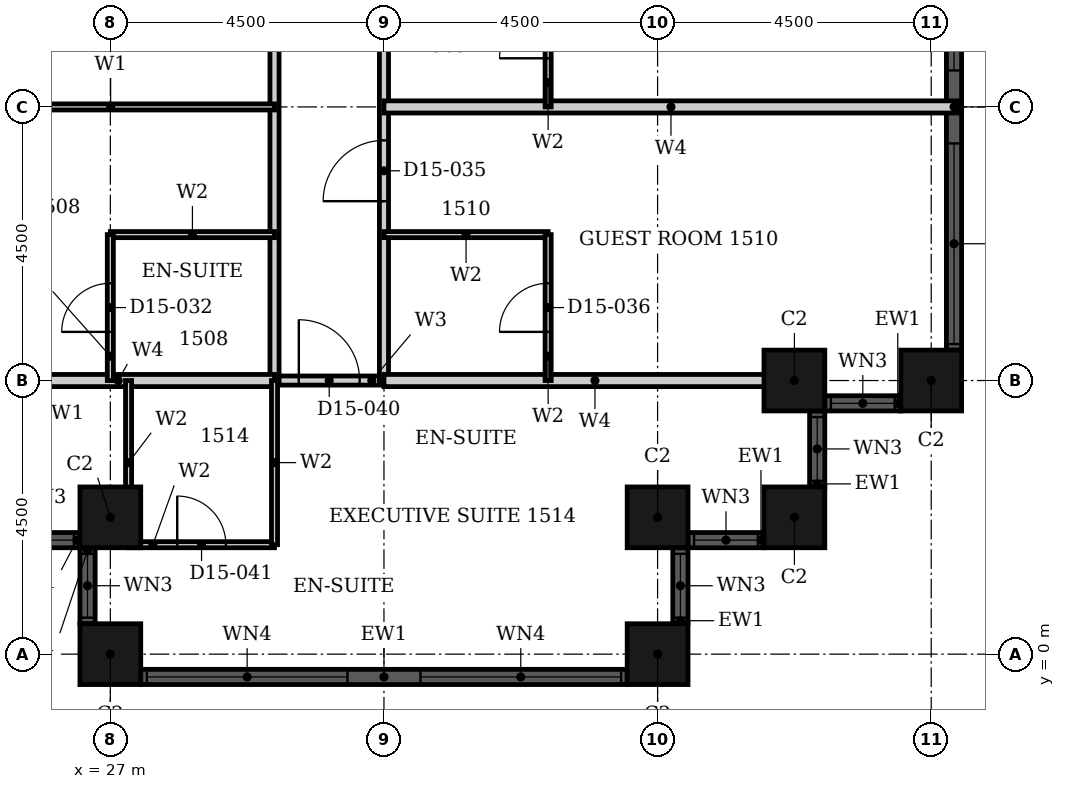
"""IFC4 building model, lengths in metres.
Left out: names, types, materials, properties, quantities, classifications, styles, units other than length and angle.
Written with IfcOpenShell. Run it as: python <this file> out.ifc"""

import sys

from ifc_helpers import new_model, si_unit, direction, frame, frame_2d, origin, origin_2d, place, context, subcontext, project, spatial, rectangle, hollow_rectangle, extrude, element, fill, save


model = new_model("IFC4")
c1 = context("Model", 3, precision=1e-05, world=origin(), true_north=direction((0.0, 1.0)))
c2 = subcontext(c1, "Body", "Model", "MODEL_VIEW")
j1 = project(units=[si_unit("LENGTHUNIT", "METRE"), si_unit("PLANEANGLEUNIT", "RADIAN")], contexts=[c1])
p1 = place(None, origin())
s1 = spatial("IfcSite", under=j1, at=p1, CompositionType="ELEMENT")
p2 = place(p1, origin())
s2 = spatial("IfcBuilding", under=s1, at=p2, CompositionType="ELEMENT")
p3 = place(p2, frame((0.0, 0.0, 67.2)))
s3 = spatial("IfcBuildingStorey", under=s2, at=p3, CompositionType="ELEMENT", Elevation=67.2)
for number, where, z_axis, x_axis in (
    (1, (27.0, 2.25, 0.0), (0.0, 0.0, 1.0), (1.0, 0.0, 0.0)),
    (2, (27.0, 0.0, 0.0), (0.0, 0.0, 1.0), (1.0, 0.0, 0.0)),
    (3, (36.0, 0.0, 0.0), (0.0, 0.0, 1.0), (1.0, 0.0, 0.0)),
    (4, (36.0, 2.25, 0.0), (0.0, 0.0, 1.0), (1.0, 0.0, 0.0)),
    (5, (38.25, 2.25, 0.0), (0.0, 0.0, 1.0), (1.0, 0.0, 0.0)),
    (6, (38.25, 4.5, 0.0), (0.0, 0.0, 1.0), (1.0, 0.0, 0.0)),
    (7, (40.5, 4.5, 0.0), (0.0, 0.0, 1.0), (1.0, 0.0, 0.0)),
):
    element("IfcColumn", number, at=place(p3, frame(where, z_axis=z_axis, x_axis=x_axis)), inside=s3, PredefinedType="COLUMN", context=c2, shape_type="SweptSolid", body=[
        extrude(hollow_rectangle(XDim=1.0, YDim=1.0, WallThickness=0.032, at=origin_2d()), origin(), (0.0, 0.0, 1.0), 3.6),
    ])
p4 = place(p3, frame((25.25, 1.875, 0.0), z_axis=(0.0, 0.0, 1.0), x_axis=(1.0, 0.0, 0.0)))
e8 = element("IfcWall", 8, at=p4, inside=s3, PredefinedType="SOLIDWALL", context=c2, shape_type="SweptSolid", body=[
    extrude(rectangle(XDim=1.25, YDim=0.25, at=frame_2d((0.625, 0.0))), origin(), (0.0, 0.0, 1.0), 3.6),
])
p5 = place(p4, frame((0.1, 0.0, 0.9)))
e9 = element("IfcOpeningElement", 9, at=p5, cuts=e8, PredefinedType="OPENING", context=c2, shape_type="SweptSolid", body=[
    extrude(rectangle(XDim=1.05, YDim=2.08, at=frame_2d((0.525, 1.04))), frame((0.0, 0.135, 0.0), z_axis=(0.0, -1.0, 0.0), x_axis=(1.0, 0.0, 0.0)), (0.0, 0.0, 1.0), 0.27),
])
p6 = place(p3, frame((26.625, 1.75, 0.0), z_axis=(0.0, 0.0, 1.0), x_axis=(0.0, -1.0, 0.0)))
e10 = element("IfcWall", 10, at=p6, inside=s3, PredefinedType="SOLIDWALL", context=c2, shape_type="SweptSolid", body=[
    extrude(rectangle(XDim=1.25, YDim=0.25, at=frame_2d((0.625, 0.0))), origin(), (0.0, 0.0, 1.0), 3.6),
])
p7 = place(p6, frame((0.1, 0.0, 0.9)))
e11 = element("IfcOpeningElement", 11, at=p7, cuts=e10, PredefinedType="OPENING", context=c2, shape_type="SweptSolid", body=[
    extrude(rectangle(XDim=1.05, YDim=2.08, at=frame_2d((0.525, 1.04))), frame((0.0, 0.135, 0.0), z_axis=(0.0, -1.0, 0.0), x_axis=(1.0, 0.0, 0.0)), (0.0, 0.0, 1.0), 0.27),
])
p8 = place(p3, frame((27.5, -0.375, 0.0), z_axis=(0.0, 0.0, 1.0), x_axis=(1.0, 0.0, 0.0)))
e12 = element("IfcWall", 12, at=p8, inside=s3, PredefinedType="SOLIDWALL", context=c2, shape_type="SweptSolid", body=[
    extrude(rectangle(XDim=8.0, YDim=0.25, at=frame_2d((4.0, 0.0))), origin(), (0.0, 0.0, 1.0), 3.6),
])
p9 = place(p8, frame((0.1, 0.0, 0.9)))
e13 = element("IfcOpeningElement", 13, at=p9, cuts=e12, PredefinedType="OPENING", context=c2, shape_type="SweptSolid", body=[
    extrude(rectangle(XDim=3.3, YDim=2.08, at=frame_2d((1.65, 1.04))), frame((0.0, 0.135, 0.0), z_axis=(0.0, -1.0, 0.0), x_axis=(1.0, 0.0, 0.0)), (0.0, 0.0, 1.0), 0.27),
])
p10 = place(p8, frame((4.6, 0.0, 0.9)))
e14 = element("IfcOpeningElement", 14, at=p10, cuts=e12, PredefinedType="OPENING", context=c2, shape_type="SweptSolid", body=[
    extrude(rectangle(XDim=3.3, YDim=2.08, at=frame_2d((1.65, 1.04))), frame((0.0, 0.135, 0.0), z_axis=(0.0, -1.0, 0.0), x_axis=(1.0, 0.0, 0.0)), (0.0, 0.0, 1.0), 0.27),
])
p11 = place(p3, frame((36.375, 0.5, 0.0), z_axis=(0.0, 0.0, 1.0), x_axis=(0.0, 1.0, 0.0)))
e15 = element("IfcWall", 15, at=p11, inside=s3, PredefinedType="SOLIDWALL", context=c2, shape_type="SweptSolid", body=[
    extrude(rectangle(XDim=1.25, YDim=0.25, at=frame_2d((0.625, 0.0))), origin(), (0.0, 0.0, 1.0), 3.6),
])
p12 = place(p11, frame((0.1, 0.0, 0.9)))
e16 = element("IfcOpeningElement", 16, at=p12, cuts=e15, PredefinedType="OPENING", context=c2, shape_type="SweptSolid", body=[
    extrude(rectangle(XDim=1.05, YDim=2.08, at=frame_2d((0.525, 1.04))), frame((0.0, 0.135, 0.0), z_axis=(0.0, -1.0, 0.0), x_axis=(1.0, 0.0, 0.0)), (0.0, 0.0, 1.0), 0.27),
])
p13 = place(p3, frame((36.5, 1.875, 0.0), z_axis=(0.0, 0.0, 1.0), x_axis=(1.0, 0.0, 0.0)))
e17 = element("IfcWall", 17, at=p13, inside=s3, PredefinedType="SOLIDWALL", context=c2, shape_type="SweptSolid", body=[
    extrude(rectangle(XDim=1.25, YDim=0.25, at=frame_2d((0.625, 0.0))), origin(), (0.0, 0.0, 1.0), 3.6),
])
p14 = place(p13, frame((0.1, 0.0, 0.9)))
e18 = element("IfcOpeningElement", 18, at=p14, cuts=e17, PredefinedType="OPENING", context=c2, shape_type="SweptSolid", body=[
    extrude(rectangle(XDim=1.05, YDim=2.08, at=frame_2d((0.525, 1.04))), frame((0.0, 0.135, 0.0), z_axis=(0.0, -1.0, 0.0), x_axis=(1.0, 0.0, 0.0)), (0.0, 0.0, 1.0), 0.27),
])
p15 = place(p3, frame((38.625, 2.75, 0.0), z_axis=(0.0, 0.0, 1.0), x_axis=(0.0, 1.0, 0.0)))
e19 = element("IfcWall", 19, at=p15, inside=s3, PredefinedType="SOLIDWALL", context=c2, shape_type="SweptSolid", body=[
    extrude(rectangle(XDim=1.25, YDim=0.25, at=frame_2d((0.625, 0.0))), origin(), (0.0, 0.0, 1.0), 3.6),
])
p16 = place(p15, frame((0.1, 0.0, 0.9)))
e20 = element("IfcOpeningElement", 20, at=p16, cuts=e19, PredefinedType="OPENING", context=c2, shape_type="SweptSolid", body=[
    extrude(rectangle(XDim=1.05, YDim=2.08, at=frame_2d((0.525, 1.04))), frame((0.0, 0.135, 0.0), z_axis=(0.0, -1.0, 0.0), x_axis=(1.0, 0.0, 0.0)), (0.0, 0.0, 1.0), 0.27),
])
p17 = place(p3, frame((38.75, 4.125, 0.0), z_axis=(0.0, 0.0, 1.0), x_axis=(1.0, 0.0, 0.0)))
e21 = element("IfcWall", 21, at=p17, inside=s3, PredefinedType="SOLIDWALL", context=c2, shape_type="SweptSolid", body=[
    extrude(rectangle(XDim=1.25, YDim=0.25, at=frame_2d((0.625, 0.0))), origin(), (0.0, 0.0, 1.0), 3.6),
])
p18 = place(p17, frame((0.1, 0.0, 0.9)))
e22 = element("IfcOpeningElement", 22, at=p18, cuts=e21, PredefinedType="OPENING", context=c2, shape_type="SweptSolid", body=[
    extrude(rectangle(XDim=1.05, YDim=2.08, at=frame_2d((0.525, 1.04))), frame((0.0, 0.135, 0.0), z_axis=(0.0, -1.0, 0.0), x_axis=(1.0, 0.0, 0.0)), (0.0, 0.0, 1.0), 0.27),
])
p19 = place(p3, frame((40.875, 5.0, 0.0), z_axis=(0.0, 0.0, 1.0), x_axis=(0.0, 1.0, 0.0)))
e23 = element("IfcWall", 23, at=p19, inside=s3, PredefinedType="SOLIDWALL", context=c2, shape_type="SweptSolid", body=[
    extrude(rectangle(XDim=8.0, YDim=0.25, at=frame_2d((4.0, 0.0))), origin(), (0.0, 0.0, 1.0), 3.6),
])
p20 = place(p19, frame((0.1, 0.0, 0.9)))
e24 = element("IfcOpeningElement", 24, at=p20, cuts=e23, PredefinedType="OPENING", context=c2, shape_type="SweptSolid", body=[
    extrude(rectangle(XDim=3.3, YDim=2.08, at=frame_2d((1.65, 1.04))), frame((0.0, 0.135, 0.0), z_axis=(0.0, -1.0, 0.0), x_axis=(1.0, 0.0, 0.0)), (0.0, 0.0, 1.0), 0.27),
])
p21 = place(p19, frame((4.6, 0.0, 0.9)))
e25 = element("IfcOpeningElement", 25, at=p21, cuts=e23, PredefinedType="OPENING", context=c2, shape_type="SweptSolid", body=[
    extrude(rectangle(XDim=3.3, YDim=2.08, at=frame_2d((1.65, 1.04))), frame((0.0, 0.135, 0.0), z_axis=(0.0, -1.0, 0.0), x_axis=(1.0, 0.0, 0.0)), (0.0, 0.0, 1.0), 0.27),
])
p22 = place(p3, frame((29.7, 4.5, 0.0), z_axis=(0.0, 0.0, 1.0), x_axis=(1.0, 0.0, 0.0)))
e26 = element("IfcWall", 26, at=p22, inside=s3, PredefinedType="PARTITIONING", context=c2, shape_type="SweptSolid", body=[
    extrude(rectangle(XDim=1.8, YDim=0.15, at=frame_2d((0.9, 0.0))), origin(), (0.0, 0.0, 1.0), 3.3),
])
p23 = place(p22, frame((0.4, 0.0, 0.0)))
e27 = element("IfcOpeningElement", 27, at=p23, cuts=e26, PredefinedType="OPENING", context=c2, shape_type="SweptSolid", body=[
    extrude(rectangle(XDim=1.0, YDim=2.1, at=frame_2d((0.5, 1.05))), frame((0.0, 0.085, 0.0), z_axis=(0.0, -1.0, 0.0), x_axis=(1.0, 0.0, 0.0)), (0.0, 0.0, 1.0), 0.17),
])
p24 = place(p3, frame((29.7, 4.5, 0.0), z_axis=(0.0, 0.0, 1.0), x_axis=(0.0, 1.0, 0.0)))
e28 = element("IfcWall", 28, at=p24, inside=s3, PredefinedType="PARTITIONING", context=c2, shape_type="SweptSolid", body=[
    extrude(rectangle(XDim=16.2, YDim=0.15, at=frame_2d((8.1, 0.0))), origin(), (0.0, 0.0, 1.0), 3.3),
])
p25 = place(p24, frame((6.25, 0.0, 0.0)))
e29 = element("IfcOpeningElement", 29, at=p25, cuts=e28, PredefinedType="OPENING", context=c2, shape_type="SweptSolid", body=[
    extrude(rectangle(XDim=1.0, YDim=2.1, at=frame_2d((0.5, 1.05))), frame((0.0, 0.085, 0.0), z_axis=(0.0, -1.0, 0.0), x_axis=(1.0, 0.0, 0.0)), (0.0, 0.0, 1.0), 0.17),
])
p26 = place(p3, frame((31.5, 4.5, 0.0), z_axis=(0.0, 0.0, 1.0), x_axis=(0.0, 1.0, 0.0)))
e30 = element("IfcWall", 30, at=p26, inside=s3, PredefinedType="PARTITIONING", context=c2, shape_type="SweptSolid", body=[
    extrude(rectangle(XDim=16.2, YDim=0.15, at=frame_2d((8.1, 0.0))), origin(), (0.0, 0.0, 1.0), 2.58),
])
p27 = place(p26, frame((7.45, 0.0, 0.0)))
e31 = element("IfcOpeningElement", 31, at=p27, cuts=e30, PredefinedType="OPENING", context=c2, shape_type="SweptSolid", body=[
    extrude(rectangle(XDim=1.0, YDim=2.1, at=frame_2d((0.5, 1.05))), frame((0.0, 0.085, 0.0), z_axis=(0.0, -1.0, 0.0), x_axis=(1.0, 0.0, 0.0)), (0.0, 0.0, 1.0), 0.17),
])
p28 = place(p26, frame((2.95, 0.0, 0.0)))
e32 = element("IfcOpeningElement", 32, at=p28, cuts=e30, PredefinedType="OPENING", context=c2, shape_type="SweptSolid", body=[
    extrude(rectangle(XDim=1.0, YDim=2.1, at=frame_2d((0.5, 1.05))), frame((0.0, 0.085, 0.0), z_axis=(0.0, -1.0, 0.0), x_axis=(1.0, 0.0, 0.0)), (0.0, 0.0, 1.0), 0.17),
])
p29 = place(p3, frame((22.06, 9.0, 0.0), z_axis=(0.0, 0.0, 1.0), x_axis=(1.0, 0.0, 0.0)))
e33 = element("IfcWall", 33, at=p29, inside=s3, PredefinedType="PARTITIONING", context=c2, shape_type="SweptSolid", body=[
    extrude(rectangle(XDim=7.64, YDim=0.1, at=frame_2d((3.82, 0.0))), origin(), (0.0, 0.0, 1.0), 3.3),
])
p30 = place(p29, frame((1.35, 0.0, 0.0)))
e34 = element("IfcOpeningElement", 34, at=p30, cuts=e33, PredefinedType="OPENING", context=c2, shape_type="SweptSolid", body=[
    extrude(rectangle(XDim=0.9, YDim=2.1, at=frame_2d((0.45, 1.05))), frame((0.0, 0.06, 0.0), z_axis=(0.0, -1.0, 0.0), x_axis=(1.0, 0.0, 0.0)), (0.0, 0.0, 1.0), 0.12),
])
p31 = place(p3, frame((31.5, 4.5, 0.0), z_axis=(0.0, 0.0, 1.0), x_axis=(1.0, 0.0, 0.0)))
e35 = element("IfcWall", 35, at=p31, inside=s3, PredefinedType="PARTITIONING", context=c2, shape_type="SweptSolid", body=[
    extrude(rectangle(XDim=6.94, YDim=0.2, at=frame_2d((3.47, 0.0))), origin(), (0.0, 0.0, 1.0), 3.3),
])
p32 = place(p3, frame((24.56, 4.5, 0.0), z_axis=(0.0, 0.0, 1.0), x_axis=(1.0, 0.0, 0.0)))
e36 = element("IfcWall", 36, at=p32, inside=s3, PredefinedType="PARTITIONING", context=c2, shape_type="SweptSolid", body=[
    extrude(rectangle(XDim=5.14, YDim=0.2, at=frame_2d((2.57, 0.0))), origin(), (0.0, 0.0, 1.0), 3.3),
])
p33 = place(p3, frame((31.5, 9.0, 0.0), z_axis=(0.0, 0.0, 1.0), x_axis=(1.0, 0.0, 0.0)))
e37 = element("IfcWall", 37, at=p33, inside=s3, PredefinedType="PARTITIONING", context=c2, shape_type="SweptSolid", body=[
    extrude(rectangle(XDim=9.44, YDim=0.2, at=frame_2d((4.72, 0.0))), origin(), (0.0, 0.0, 1.0), 3.3),
])
p34 = place(p3, frame((27.3, 1.8, 0.0), z_axis=(0.0, 0.0, 1.0), x_axis=(1.0, 0.0, 0.0)))
e38 = element("IfcWall", 38, at=p34, inside=s3, PredefinedType="PARTITIONING", context=c2, shape_type="SweptSolid", body=[
    extrude(rectangle(XDim=2.4, YDim=0.1, at=frame_2d((1.2, 0.0))), origin(), (0.0, 0.0, 1.0), 3.3),
])
p35 = place(p34, frame((0.8, 0.0, 0.0)))
e39 = element("IfcOpeningElement", 39, at=p35, cuts=e38, PredefinedType="OPENING", context=c2, shape_type="SweptSolid", body=[
    extrude(rectangle(XDim=0.8, YDim=2.1, at=frame_2d((0.4, 1.05))), frame((0.0, 0.06, 0.0), z_axis=(0.0, -1.0, 0.0), x_axis=(1.0, 0.0, 0.0)), (0.0, 0.0, 1.0), 0.12),
])
for number, where, z_axis, x_axis in (
    (40, (31.5, 6.9, 0.0), (0.0, 0.0, 1.0), (1.0, 0.0, 0.0)),
    (41, (27.0, 6.9, 0.0), (0.0, 0.0, 1.0), (1.0, 0.0, 0.0)),
):
    element("IfcWall", number, at=place(p3, frame(where, z_axis=z_axis, x_axis=x_axis)), inside=s3, PredefinedType="PARTITIONING", context=c2, shape_type="SweptSolid", body=[
        extrude(rectangle(XDim=2.7, YDim=0.1, at=frame_2d((1.35, 0.0))), origin(), (0.0, 0.0, 1.0), 3.3),
    ])
p36 = place(p3, frame((27.0, 4.5, 0.0), z_axis=(0.0, 0.0, 1.0), x_axis=(0.0, 1.0, 0.0)))
e42 = element("IfcWall", 42, at=p36, inside=s3, PredefinedType="PARTITIONING", context=c2, shape_type="SweptSolid", body=[
    extrude(rectangle(XDim=2.4, YDim=0.1, at=frame_2d((1.2, 0.0))), origin(), (0.0, 0.0, 1.0), 2.58),
])
p37 = place(p36, frame((0.8, 0.0, 0.0)))
e43 = element("IfcOpeningElement", 43, at=p37, cuts=e42, PredefinedType="OPENING", context=c2, shape_type="SweptSolid", body=[
    extrude(rectangle(XDim=0.8, YDim=2.1, at=frame_2d((0.4, 1.05))), frame((0.0, 0.06, 0.0), z_axis=(0.0, -1.0, 0.0), x_axis=(1.0, 0.0, 0.0)), (0.0, 0.0, 1.0), 0.12),
])
for number, where, z_axis, x_axis in (
    (44, (27.3, 1.8, 0.0), (0.0, 0.0, 1.0), (0.0, 1.0, 0.0)),
    (45, (29.7, 1.8, 0.0), (0.0, 0.0, 1.0), (0.0, 1.0, 0.0)),
):
    element("IfcWall", number, at=place(p3, frame(where, z_axis=z_axis, x_axis=x_axis)), inside=s3, PredefinedType="PARTITIONING", context=c2, shape_type="SweptSolid", body=[
        extrude(rectangle(XDim=2.7, YDim=0.1, at=frame_2d((1.35, 0.0))), origin(), (0.0, 0.0, 1.0), 3.3),
    ])
p38 = place(p3, frame((34.2, 9.0, 0.0), z_axis=(0.0, 0.0, 1.0), x_axis=(0.0, 1.0, 0.0)))
e46 = element("IfcWall", 46, at=p38, inside=s3, PredefinedType="PARTITIONING", context=c2, shape_type="SweptSolid", body=[
    extrude(rectangle(XDim=2.4, YDim=0.1, at=frame_2d((1.2, 0.0))), origin(), (0.0, 0.0, 1.0), 3.3),
])
p39 = place(p38, frame((0.8, 0.0, 0.0)))
e47 = element("IfcOpeningElement", 47, at=p39, cuts=e46, PredefinedType="OPENING", context=c2, shape_type="SweptSolid", body=[
    extrude(rectangle(XDim=0.8, YDim=2.1, at=frame_2d((0.4, 1.05))), frame((0.0, 0.06, 0.0), z_axis=(0.0, -1.0, 0.0), x_axis=(1.0, 0.0, 0.0)), (0.0, 0.0, 1.0), 0.12),
])
p40 = place(p3, frame((34.2, 4.5, 0.0), z_axis=(0.0, 0.0, 1.0), x_axis=(0.0, 1.0, 0.0)))
e48 = element("IfcWall", 48, at=p40, inside=s3, PredefinedType="PARTITIONING", context=c2, shape_type="SweptSolid", body=[
    extrude(rectangle(XDim=2.4, YDim=0.1, at=frame_2d((1.2, 0.0))), origin(), (0.0, 0.0, 1.0), 3.3),
])
p41 = place(p40, frame((0.8, 0.0, 0.0)))
e49 = element("IfcOpeningElement", 49, at=p41, cuts=e48, PredefinedType="OPENING", context=c2, shape_type="SweptSolid", body=[
    extrude(rectangle(XDim=0.8, YDim=2.1, at=frame_2d((0.4, 1.05))), frame((0.0, 0.06, 0.0), z_axis=(0.0, -1.0, 0.0), x_axis=(1.0, 0.0, 0.0)), (0.0, 0.0, 1.0), 0.12),
])
p42 = place(p5, origin())
e50 = element("IfcWindow", 50, at=p42, inside=s3, PartitioningType="SINGLE_PANEL", PredefinedType="WINDOW", context=c2, shape_type="SweptSolid", body=[
    extrude(rectangle(XDim=1.05, YDim=2.08, at=frame_2d((0.525, 1.04))), frame((0.0, 0.03, 0.0), z_axis=(0.0, -1.0, 0.0), x_axis=(1.0, 0.0, 0.0)), (0.0, 0.0, 1.0), 0.06),
])
fill(e9, e50)
p43 = place(p7, origin())
e51 = element("IfcWindow", 51, at=p43, inside=s3, PartitioningType="SINGLE_PANEL", PredefinedType="WINDOW", context=c2, shape_type="SweptSolid", body=[
    extrude(rectangle(XDim=1.05, YDim=2.08, at=frame_2d((0.525, 1.04))), frame((0.0, 0.03, 0.0), z_axis=(0.0, -1.0, 0.0), x_axis=(1.0, 0.0, 0.0)), (0.0, 0.0, 1.0), 0.06),
])
fill(e11, e51)
p44 = place(p9, origin())
e52 = element("IfcWindow", 52, at=p44, inside=s3, PartitioningType="SINGLE_PANEL", PredefinedType="WINDOW", context=c2, shape_type="SweptSolid", body=[
    extrude(rectangle(XDim=3.3, YDim=2.08, at=frame_2d((1.65, 1.04))), frame((0.0, 0.03, 0.0), z_axis=(0.0, -1.0, 0.0), x_axis=(1.0, 0.0, 0.0)), (0.0, 0.0, 1.0), 0.06),
])
fill(e13, e52)
p45 = place(p10, origin())
e53 = element("IfcWindow", 53, at=p45, inside=s3, PartitioningType="SINGLE_PANEL", PredefinedType="WINDOW", context=c2, shape_type="SweptSolid", body=[
    extrude(rectangle(XDim=3.3, YDim=2.08, at=frame_2d((1.65, 1.04))), frame((0.0, 0.03, 0.0), z_axis=(0.0, -1.0, 0.0), x_axis=(1.0, 0.0, 0.0)), (0.0, 0.0, 1.0), 0.06),
])
fill(e14, e53)
p46 = place(p12, origin())
e54 = element("IfcWindow", 54, at=p46, inside=s3, PartitioningType="SINGLE_PANEL", PredefinedType="WINDOW", context=c2, shape_type="SweptSolid", body=[
    extrude(rectangle(XDim=1.05, YDim=2.08, at=frame_2d((0.525, 1.04))), frame((0.0, 0.03, 0.0), z_axis=(0.0, -1.0, 0.0), x_axis=(1.0, 0.0, 0.0)), (0.0, 0.0, 1.0), 0.06),
])
fill(e16, e54)
p47 = place(p14, origin())
e55 = element("IfcWindow", 55, at=p47, inside=s3, PartitioningType="SINGLE_PANEL", PredefinedType="WINDOW", context=c2, shape_type="SweptSolid", body=[
    extrude(rectangle(XDim=1.05, YDim=2.08, at=frame_2d((0.525, 1.04))), frame((0.0, 0.03, 0.0), z_axis=(0.0, -1.0, 0.0), x_axis=(1.0, 0.0, 0.0)), (0.0, 0.0, 1.0), 0.06),
])
fill(e18, e55)
p48 = place(p16, origin())
e56 = element("IfcWindow", 56, at=p48, inside=s3, PartitioningType="SINGLE_PANEL", PredefinedType="WINDOW", context=c2, shape_type="SweptSolid", body=[
    extrude(rectangle(XDim=1.05, YDim=2.08, at=frame_2d((0.525, 1.04))), frame((0.0, 0.03, 0.0), z_axis=(0.0, -1.0, 0.0), x_axis=(1.0, 0.0, 0.0)), (0.0, 0.0, 1.0), 0.06),
])
fill(e20, e56)
p49 = place(p18, origin())
e57 = element("IfcWindow", 57, at=p49, inside=s3, PartitioningType="SINGLE_PANEL", PredefinedType="WINDOW", context=c2, shape_type="SweptSolid", body=[
    extrude(rectangle(XDim=1.05, YDim=2.08, at=frame_2d((0.525, 1.04))), frame((0.0, 0.03, 0.0), z_axis=(0.0, -1.0, 0.0), x_axis=(1.0, 0.0, 0.0)), (0.0, 0.0, 1.0), 0.06),
])
fill(e22, e57)
p50 = place(p20, origin())
e58 = element("IfcWindow", 58, at=p50, inside=s3, PartitioningType="SINGLE_PANEL", PredefinedType="WINDOW", context=c2, shape_type="SweptSolid", body=[
    extrude(rectangle(XDim=3.3, YDim=2.08, at=frame_2d((1.65, 1.04))), frame((0.0, 0.03, 0.0), z_axis=(0.0, -1.0, 0.0), x_axis=(1.0, 0.0, 0.0)), (0.0, 0.0, 1.0), 0.06),
])
fill(e24, e58)
p51 = place(p21, origin())
e59 = element("IfcWindow", 59, at=p51, inside=s3, PartitioningType="SINGLE_PANEL", PredefinedType="WINDOW", context=c2, shape_type="SweptSolid", body=[
    extrude(rectangle(XDim=3.3, YDim=2.08, at=frame_2d((1.65, 1.04))), frame((0.0, 0.03, 0.0), z_axis=(0.0, -1.0, 0.0), x_axis=(1.0, 0.0, 0.0)), (0.0, 0.0, 1.0), 0.06),
])
fill(e25, e59)
p52 = place(p37, origin())
e60 = element("IfcDoor", 60, at=p52, inside=s3, OperationType="SINGLE_SWING_RIGHT", PredefinedType="DOOR", context=c2, shape_type="SweptSolid", body=[
    extrude(rectangle(XDim=0.8, YDim=2.1, at=frame_2d((0.4, 1.05))), frame((0.0, 0.025, 0.0), z_axis=(0.0, -1.0, 0.0), x_axis=(1.0, 0.0, 0.0)), (0.0, 0.0, 1.0), 0.05),
])
fill(e43, e60)
p53 = place(p39, origin())
e61 = element("IfcDoor", 61, at=p53, inside=s3, OperationType="SINGLE_SWING_RIGHT", PredefinedType="DOOR", context=c2, shape_type="SweptSolid", body=[
    extrude(rectangle(XDim=0.8, YDim=2.1, at=frame_2d((0.4, 1.05))), frame((0.0, 0.025, 0.0), z_axis=(0.0, -1.0, 0.0), x_axis=(1.0, 0.0, 0.0)), (0.0, 0.0, 1.0), 0.05),
])
fill(e47, e61)
p54 = place(p28, origin())
e62 = element("IfcDoor", 62, at=p54, inside=s3, OperationType="SINGLE_SWING_RIGHT", PredefinedType="DOOR", context=c2, shape_type="SweptSolid", body=[
    extrude(rectangle(XDim=1.0, YDim=2.1, at=frame_2d((0.5, 1.05))), frame((0.0, 0.025, 0.0), z_axis=(0.0, -1.0, 0.0), x_axis=(1.0, 0.0, 0.0)), (0.0, 0.0, 1.0), 0.05),
])
fill(e32, e62)
p55 = place(p41, origin())
e63 = element("IfcDoor", 63, at=p55, inside=s3, OperationType="SINGLE_SWING_RIGHT", PredefinedType="DOOR", context=c2, shape_type="SweptSolid", body=[
    extrude(rectangle(XDim=0.8, YDim=2.1, at=frame_2d((0.4, 1.05))), frame((0.0, 0.025, 0.0), z_axis=(0.0, -1.0, 0.0), x_axis=(1.0, 0.0, 0.0)), (0.0, 0.0, 1.0), 0.05),
])
fill(e49, e63)
p56 = place(p23, origin())
e64 = element("IfcDoor", 64, at=p56, inside=s3, OperationType="SINGLE_SWING_RIGHT", PredefinedType="DOOR", context=c2, shape_type="SweptSolid", body=[
    extrude(rectangle(XDim=1.0, YDim=2.1, at=frame_2d((0.5, 1.05))), frame((0.0, 0.025, 0.0), z_axis=(0.0, -1.0, 0.0), x_axis=(1.0, 0.0, 0.0)), (0.0, 0.0, 1.0), 0.05),
])
fill(e27, e64)
p57 = place(p35, origin())
e65 = element("IfcDoor", 65, at=p57, inside=s3, OperationType="SINGLE_SWING_RIGHT", PredefinedType="DOOR", context=c2, shape_type="SweptSolid", body=[
    extrude(rectangle(XDim=0.8, YDim=2.1, at=frame_2d((0.4, 1.05))), frame((0.0, 0.025, 0.0), z_axis=(0.0, -1.0, 0.0), x_axis=(1.0, 0.0, 0.0)), (0.0, 0.0, 1.0), 0.05),
])
fill(e39, e65)
save(model, sys.argv[1])
